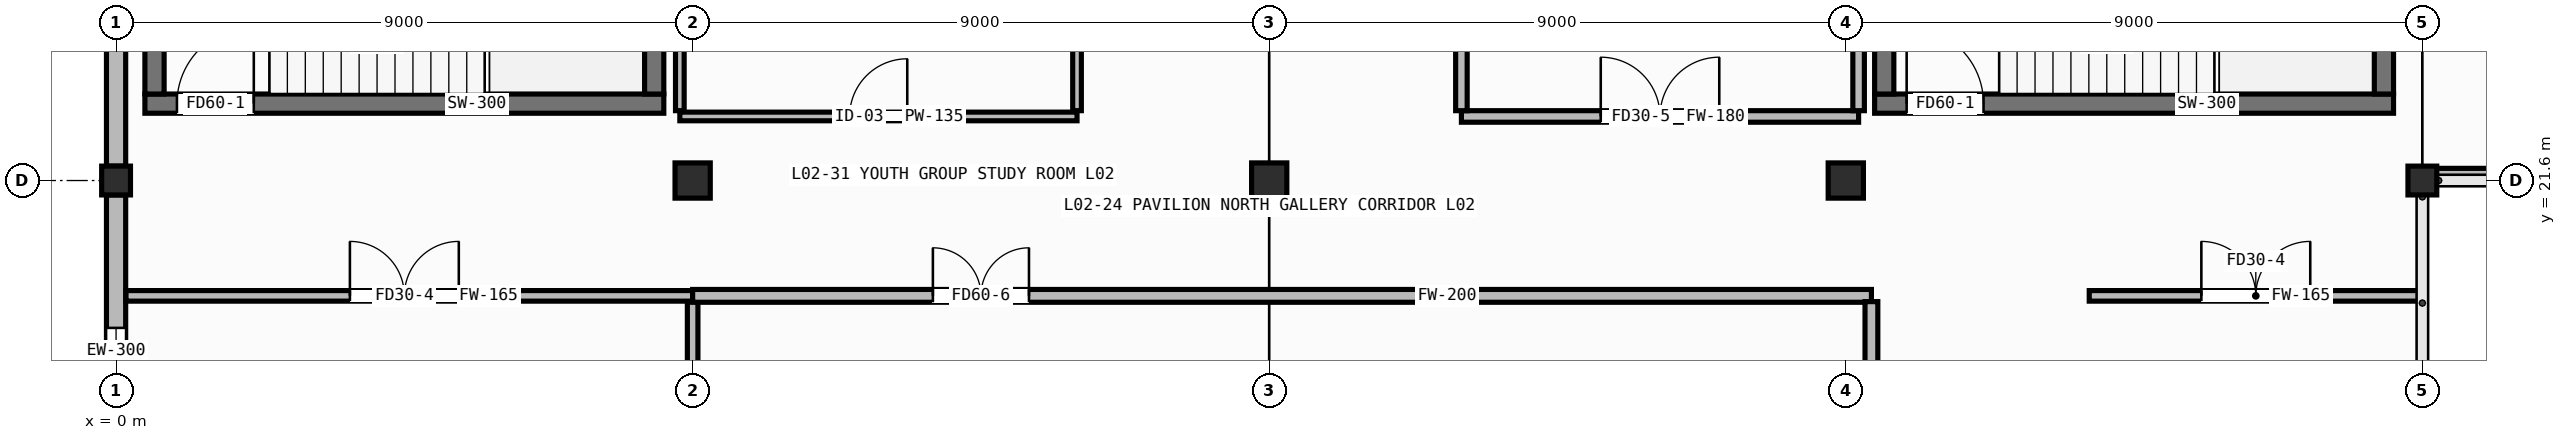
"""IFC4 building model, lengths in metres.
Left out: names, types, materials, properties, quantities, classifications, styles, units other than length and angle.
Written with IfcOpenShell. Run it as: python <this file> out.ifc"""

import sys

from ifc_helpers import new_model, si_unit, direction, frame, frame_2d, origin, origin_2d, place, context, subcontext, project, spatial, rectangle, hollow_rectangle, extrude, element, fill, save


model = new_model("IFC4")
c1 = context("Model", 3, precision=1e-05, world=origin(), true_north=direction((0.0, 1.0)))
c2 = subcontext(c1, "Body", "Model", "MODEL_VIEW")
j1 = project(units=[si_unit("LENGTHUNIT", "METRE"), si_unit("PLANEANGLEUNIT", "RADIAN")], contexts=[c1])
p1 = place(None, origin())
s1 = spatial("IfcSite", under=j1, at=p1, CompositionType="ELEMENT")
p2 = place(p1, origin())
s2 = spatial("IfcBuilding", under=s1, at=p2, CompositionType="ELEMENT")
p3 = place(p2, frame((0.0, 0.0, 4.8)))
s3 = spatial("IfcBuildingStorey", under=s2, at=p3, CompositionType="ELEMENT", Elevation=4.8)
p4 = place(p3, frame((0.0, 21.6, 0.0), z_axis=(0.0, 0.0, 1.0), x_axis=(1.0, 0.0, 0.0)))
e1 = element("IfcColumn", 1, at=p4, inside=s3, PredefinedType="COLUMN", context=c2, shape_type="SweptSolid", body=[
    extrude(hollow_rectangle(XDim=0.45, YDim=0.45, WallThickness=0.019, at=origin_2d()), origin(), (0.0, 0.0, 1.0), 4.0),
])
for number, where, z_axis, x_axis in (
    (2, (9.0, 21.6, 0.0), (0.0, 0.0, 1.0), (1.0, 0.0, 0.0)),
    (3, (18.0, 21.6, 0.0), (0.0, 0.0, 1.0), (1.0, 0.0, 0.0)),
    (4, (27.0, 21.6, 0.0), (0.0, 0.0, 1.0), (1.0, 0.0, 0.0)),
):
    element("IfcColumn", number, at=place(p3, frame(where, z_axis=z_axis, x_axis=x_axis)), inside=s3, PredefinedType="COLUMN", context=c2, shape_type="SweptSolid", body=[
        extrude(hollow_rectangle(XDim=0.55, YDim=0.55, WallThickness=0.022, at=origin_2d()), origin(), (0.0, 0.0, 1.0), 4.0),
    ])
p5 = place(p3, frame((36.0, 21.6, 0.0), z_axis=(0.0, 0.0, 1.0), x_axis=(1.0, 0.0, 0.0)))
e5 = element("IfcColumn", 5, at=p5, inside=s3, PredefinedType="COLUMN", context=c2, shape_type="SweptSolid", body=[
    extrude(hollow_rectangle(XDim=0.45, YDim=0.45, WallThickness=0.019, at=origin_2d()), origin(), (0.0, 0.0, 1.0), 4.0),
])
p6 = place(p3, frame((0.0, 14.625, 0.0), z_axis=(0.0, 0.0, 1.0), x_axis=(0.0, 1.0, 0.0)))
e6 = element("IfcWall", 6, at=p6, inside=s3, PredefinedType="STANDARD", context=c2, shape_type="SweptSolid", body=[
    extrude(rectangle(XDim=6.75, YDim=0.3, at=frame_2d((3.375, 0.0))), origin(), (0.0, 0.0, 1.0), 3.255),
])
p7 = place(p6, frame((2.075, 0.0, 0.85)))
e7 = element("IfcOpeningElement", 7, at=p7, cuts=e6, PredefinedType="OPENING", context=c2, shape_type="SweptSolid", body=[
    extrude(rectangle(XDim=2.6, YDim=1.6, at=frame_2d((1.3, 0.8))), frame((0.0, 0.162, 0.0), z_axis=(0.0, -1.0, 0.0), x_axis=(1.0, 0.0, 0.0)), (0.0, 0.0, 1.0), 0.324),
])
p8 = place(p3, frame((0.0, 21.825, 0.0), z_axis=(0.0, 0.0, 1.0), x_axis=(0.0, 1.0, 0.0)))
e8 = element("IfcWall", 8, at=p8, inside=s3, PredefinedType="STANDARD", context=c2, shape_type="SweptSolid", body=[
    extrude(rectangle(XDim=6.75, YDim=0.3, at=frame_2d((3.375, 0.0))), origin(), (0.0, 0.0, 1.0), 3.255),
])
p9 = place(p3, frame((36.0, 21.695, 4.0), z_axis=(0.0, 0.0, 1.0), x_axis=(1.0, 0.0, 0.0)))
e9 = element("IfcWall", 9, at=p9, inside=s3, PredefinedType="PARAPET", context=c2, shape_type="SweptSolid", body=[
    extrude(rectangle(XDim=9.0, YDim=0.19, at=frame_2d((4.5, 0.0))), origin(), (0.0, 0.0, 1.0), 0.65),
])
p10 = place(p3, frame((0.45, 22.8, 0.0), z_axis=(0.0, 0.0, 1.0), x_axis=(1.0, 0.0, 0.0)))
e10 = element("IfcWall", 10, at=p10, inside=s3, PredefinedType="SHEAR", context=c2, shape_type="SweptSolid", body=[
    extrude(rectangle(XDim=8.1, YDim=0.3, at=frame_2d((4.05, 0.0))), origin(), (0.0, 0.0, 1.0), 3.755),
])
p11 = place(p10, frame((0.5, 0.0, 0.0)))
e11 = element("IfcOpeningElement", 11, at=p11, cuts=e10, PredefinedType="OPENING", context=c2, shape_type="SweptSolid", body=[
    extrude(rectangle(XDim=1.2, YDim=2.1, at=frame_2d((0.6, 1.05))), frame((0.0, 0.162, 0.0), z_axis=(0.0, -1.0, 0.0), x_axis=(1.0, 0.0, 0.0)), (0.0, 0.0, 1.0), 0.324),
])
for number, where, z_axis, x_axis in (
    (12, (0.6, 22.95, 0.0), (0.0, 0.0, 1.0), (0.0, 1.0, 0.0)),
    (13, (8.4, 22.95, 0.0), (0.0, 0.0, 1.0), (0.0, 1.0, 0.0)),
):
    element("IfcWall", number, at=place(p3, frame(where, z_axis=z_axis, x_axis=x_axis)), inside=s3, PredefinedType="SHEAR", context=c2, shape_type="SweptSolid", body=[
        extrude(rectangle(XDim=3.8, YDim=0.3, at=frame_2d((1.9, 0.0))), origin(), (0.0, 0.0, 1.0), 3.755),
    ])
p12 = place(p3, frame((27.45, 22.8, 0.0), z_axis=(0.0, 0.0, 1.0), x_axis=(1.0, 0.0, 0.0)))
e14 = element("IfcWall", 14, at=p12, inside=s3, PredefinedType="SHEAR", context=c2, shape_type="SweptSolid", body=[
    extrude(rectangle(XDim=8.1, YDim=0.3, at=frame_2d((4.05, 0.0))), origin(), (0.0, 0.0, 1.0), 3.755),
])
p13 = place(p12, frame((0.5, 0.0, 0.0)))
e15 = element("IfcOpeningElement", 15, at=p13, cuts=e14, PredefinedType="OPENING", context=c2, shape_type="SweptSolid", body=[
    extrude(rectangle(XDim=1.2, YDim=2.1, at=frame_2d((0.6, 1.05))), frame((0.0, 0.162, 0.0), z_axis=(0.0, -1.0, 0.0), x_axis=(1.0, 0.0, 0.0)), (0.0, 0.0, 1.0), 0.324),
])
for number, where, z_axis, x_axis in (
    (16, (27.6, 22.95, 0.0), (0.0, 0.0, 1.0), (0.0, 1.0, 0.0)),
    (17, (35.4, 22.95, 0.0), (0.0, 0.0, 1.0), (0.0, 1.0, 0.0)),
):
    element("IfcWall", number, at=place(p3, frame(where, z_axis=z_axis, x_axis=x_axis)), inside=s3, PredefinedType="SHEAR", context=c2, shape_type="SweptSolid", body=[
        extrude(rectangle(XDim=3.8, YDim=0.3, at=frame_2d((1.9, 0.0))), origin(), (0.0, 0.0, 1.0), 3.755),
    ])
p14 = place(p3, frame((0.155, 19.8, 0.0), z_axis=(0.0, 0.0, 1.0), x_axis=(1.0, 0.0, 0.0)))
e18 = element("IfcWall", 18, at=p14, inside=s3, PredefinedType="PARTITIONING", context=c2, shape_type="SweptSolid", body=[
    extrude(rectangle(XDim=8.845, YDim=0.165, at=frame_2d((4.422, 0.0))), origin(), (0.0, 0.0, 1.0), 3.755),
])
p15 = place(p14, frame((3.495, 0.0, 0.0)))
e19 = element("IfcOpeningElement", 19, at=p15, cuts=e18, PredefinedType="OPENING", context=c2, shape_type="SweptSolid", body=[
    extrude(rectangle(XDim=1.7, YDim=2.12, at=frame_2d((0.85, 1.06))), frame((0.0, 0.094, 0.0), z_axis=(0.0, -1.0, 0.0), x_axis=(1.0, 0.0, 0.0)), (0.0, 0.0, 1.0), 0.189),
])
p16 = place(p3, frame((9.0, 0.585, 0.0), z_axis=(0.0, 0.0, 1.0), x_axis=(0.0, 1.0, 0.0)))
e20 = element("IfcWall", 20, at=p16, inside=s3, PredefinedType="PARTITIONING", context=c2, shape_type="SweptSolid", body=[
    extrude(rectangle(XDim=19.125, YDim=0.165, at=frame_2d((9.562, 0.0))), origin(), (0.0, 0.0, 1.0), 3.035),
])
p17 = place(p3, frame((9.0, 19.8, 0.0), z_axis=(0.0, 0.0, 1.0), x_axis=(1.0, 0.0, 0.0)))
e21 = element("IfcWall", 21, at=p17, inside=s3, PredefinedType="PARTITIONING", context=c2, shape_type="SweptSolid", body=[
    extrude(rectangle(XDim=18.4, YDim=0.2, at=frame_2d((9.2, 0.0))), origin(), (0.0, 0.0, 1.0), 3.755),
])
p18 = place(p17, frame((3.75, 0.0, 0.0)))
e22 = element("IfcOpeningElement", 22, at=p18, cuts=e21, PredefinedType="OPENING", context=c2, shape_type="SweptSolid", body=[
    extrude(rectangle(XDim=1.5, YDim=2.1, at=frame_2d((0.75, 1.05))), frame((0.0, 0.112, 0.0), z_axis=(0.0, -1.0, 0.0), x_axis=(1.0, 0.0, 0.0)), (0.0, 0.0, 1.0), 0.224),
])
p19 = place(p3, frame((27.4, 0.165, 0.0), z_axis=(0.0, 0.0, 1.0), x_axis=(0.0, 1.0, 0.0)))
e23 = element("IfcWall", 23, at=p19, inside=s3, PredefinedType="PARTITIONING", context=c2, shape_type="SweptSolid", body=[
    extrude(rectangle(XDim=19.545, YDim=0.2, at=frame_2d((9.772, 0.0))), origin(), (0.0, 0.0, 1.0), 3.755),
])
p20 = place(p3, frame((30.8, 19.8, 0.0), z_axis=(0.0, 0.0, 1.0), x_axis=(1.0, 0.0, 0.0)))
e24 = element("IfcWall", 24, at=p20, inside=s3, PredefinedType="PARTITIONING", context=c2, shape_type="SweptSolid", body=[
    extrude(rectangle(XDim=5.165, YDim=0.165, at=frame_2d((2.583, 0.0))), origin(), (0.0, 0.0, 1.0), 3.755),
])
p21 = place(p20, frame((1.75, 0.0, 0.0)))
e25 = element("IfcOpeningElement", 25, at=p21, cuts=e24, PredefinedType="OPENING", context=c2, shape_type="SweptSolid", body=[
    extrude(rectangle(XDim=1.7, YDim=2.12, at=frame_2d((0.85, 1.06))), frame((0.0, 0.094, 0.0), z_axis=(0.0, -1.0, 0.0), x_axis=(1.0, 0.0, 0.0)), (0.0, 0.0, 1.0), 0.189),
])
p22 = place(p3, frame((8.8, 22.6, 0.0), z_axis=(0.0, 0.0, 1.0), x_axis=(1.0, 0.0, 0.0)))
e26 = element("IfcWall", 26, at=p22, inside=s3, PredefinedType="PARTITIONING", context=c2, shape_type="SweptSolid", body=[
    extrude(rectangle(XDim=6.2, YDim=0.135, at=frame_2d((3.1, 0.0))), origin(), (0.0, 0.0, 1.0), 3.755),
])
p23 = place(p22, frame((2.65, 0.0, 0.0)))
e27 = element("IfcOpeningElement", 27, at=p23, cuts=e26, PredefinedType="OPENING", context=c2, shape_type="SweptSolid", body=[
    extrude(rectangle(XDim=0.9, YDim=2.02, at=frame_2d((0.45, 1.01))), frame((0.0, 0.08, 0.0), z_axis=(0.0, -1.0, 0.0), x_axis=(1.0, 0.0, 0.0)), (0.0, 0.0, 1.0), 0.159),
])
p24 = place(p3, frame((8.8, 22.69, 0.0), z_axis=(0.0, 0.0, 1.0), x_axis=(0.0, 1.0, 0.0)))
e28 = element("IfcWall", 28, at=p24, inside=s3, PredefinedType="PARTITIONING", context=c2, shape_type="SweptSolid", body=[
    extrude(rectangle(XDim=4.42, YDim=0.135, at=frame_2d((2.21, 0.0))), origin(), (0.0, 0.0, 1.0), 3.035),
])
p25 = place(p3, frame((15.0, 22.69, 0.0), z_axis=(0.0, 0.0, 1.0), x_axis=(0.0, 1.0, 0.0)))
e29 = element("IfcWall", 29, at=p25, inside=s3, PredefinedType="PARTITIONING", context=c2, shape_type="SweptSolid", body=[
    extrude(rectangle(XDim=4.42, YDim=0.135, at=frame_2d((2.21, 0.0))), origin(), (0.0, 0.0, 1.0), 3.755),
])
p26 = place(p3, frame((21.0, 22.6, 0.0), z_axis=(0.0, 0.0, 1.0), x_axis=(1.0, 0.0, 0.0)))
e30 = element("IfcWall", 30, at=p26, inside=s3, PredefinedType="PARTITIONING", context=c2, shape_type="SweptSolid", body=[
    extrude(rectangle(XDim=6.2, YDim=0.18, at=frame_2d((3.1, 0.0))), origin(), (0.0, 0.0, 1.0), 3.755),
])
p27 = place(p26, frame((2.175, 0.0, 0.0)))
e31 = element("IfcOpeningElement", 31, at=p27, cuts=e30, PredefinedType="OPENING", context=c2, shape_type="SweptSolid", body=[
    extrude(rectangle(XDim=1.85, YDim=2.12, at=frame_2d((0.925, 1.06))), frame((0.0, 0.102, 0.0), z_axis=(0.0, -1.0, 0.0), x_axis=(1.0, 0.0, 0.0)), (0.0, 0.0, 1.0), 0.204),
])
p28 = place(p3, frame((21.0, 22.69, 0.0), z_axis=(0.0, 0.0, 1.0), x_axis=(0.0, 1.0, 0.0)))
e32 = element("IfcWall", 32, at=p28, inside=s3, PredefinedType="PARTITIONING", context=c2, shape_type="SweptSolid", body=[
    extrude(rectangle(XDim=4.42, YDim=0.18, at=frame_2d((2.21, 0.0))), origin(), (0.0, 0.0, 1.0), 3.755),
])
p29 = place(p3, frame((27.2, 22.69, 0.0), z_axis=(0.0, 0.0, 1.0), x_axis=(0.0, 1.0, 0.0)))
e33 = element("IfcWall", 33, at=p29, inside=s3, PredefinedType="PARTITIONING", context=c2, shape_type="SweptSolid", body=[
    extrude(rectangle(XDim=4.42, YDim=0.18, at=frame_2d((2.21, 0.0))), origin(), (0.0, 0.0, 1.0), 3.035),
])
p30 = place(p7, origin())
e34 = element("IfcWindow", 34, at=p30, inside=s3, PartitioningType="DOUBLE_PANEL_VERTICAL", PredefinedType="WINDOW", context=c2, shape_type="SweptSolid", body=[
    extrude(rectangle(XDim=2.6, YDim=1.6, at=frame_2d((1.3, 0.8))), frame((0.0, 0.03, 0.0), z_axis=(0.0, -1.0, 0.0), x_axis=(1.0, 0.0, 0.0)), (0.0, 0.0, 1.0), 0.06),
])
fill(e7, e34)
p31 = place(p11, origin())
e35 = element("IfcDoor", 35, at=p31, inside=s3, OperationType="SINGLE_SWING_RIGHT", PredefinedType="DOOR", context=c2, shape_type="SweptSolid", body=[
    extrude(rectangle(XDim=1.2, YDim=2.1, at=frame_2d((0.6, 1.05))), frame((0.0, 0.025, 0.0), z_axis=(0.0, -1.0, 0.0), x_axis=(1.0, 0.0, 0.0)), (0.0, 0.0, 1.0), 0.05),
])
fill(e11, e35)
p32 = place(p13, origin())
e36 = element("IfcDoor", 36, at=p32, inside=s3, OperationType="SINGLE_SWING_LEFT", PredefinedType="DOOR", context=c2, shape_type="SweptSolid", body=[
    extrude(rectangle(XDim=1.2, YDim=2.1, at=frame_2d((0.6, 1.05))), frame((0.0, 0.025, 0.0), z_axis=(0.0, -1.0, 0.0), x_axis=(1.0, 0.0, 0.0)), (0.0, 0.0, 1.0), 0.05),
])
fill(e15, e36)
p33 = place(p15, origin())
e37 = element("IfcDoor", 37, at=p33, inside=s3, OperationType="DOUBLE_DOOR_SINGLE_SWING", PredefinedType="DOOR", context=c2, shape_type="SweptSolid", body=[
    extrude(rectangle(XDim=1.7, YDim=2.12, at=frame_2d((0.85, 1.06))), frame((0.0, 0.025, 0.0), z_axis=(0.0, -1.0, 0.0), x_axis=(1.0, 0.0, 0.0)), (0.0, 0.0, 1.0), 0.05),
])
fill(e19, e37)
p34 = place(p18, origin())
e38 = element("IfcDoor", 38, at=p34, inside=s3, OperationType="DOUBLE_DOOR_SINGLE_SWING", PredefinedType="DOOR", context=c2, shape_type="SweptSolid", body=[
    extrude(rectangle(XDim=1.5, YDim=2.1, at=frame_2d((0.75, 1.05))), frame((0.0, 0.025, 0.0), z_axis=(0.0, -1.0, 0.0), x_axis=(1.0, 0.0, 0.0)), (0.0, 0.0, 1.0), 0.05),
])
fill(e22, e38)
p35 = place(p21, origin())
e39 = element("IfcDoor", 39, at=p35, inside=s3, OperationType="DOUBLE_DOOR_SINGLE_SWING", PredefinedType="DOOR", context=c2, shape_type="SweptSolid", body=[
    extrude(rectangle(XDim=1.7, YDim=2.12, at=frame_2d((0.85, 1.06))), frame((0.0, 0.025, 0.0), z_axis=(0.0, -1.0, 0.0), x_axis=(1.0, 0.0, 0.0)), (0.0, 0.0, 1.0), 0.05),
])
fill(e25, e39)
p36 = place(p23, origin())
e40 = element("IfcDoor", 40, at=p36, inside=s3, OperationType="SINGLE_SWING_RIGHT", PredefinedType="DOOR", context=c2, shape_type="SweptSolid", body=[
    extrude(rectangle(XDim=0.9, YDim=2.02, at=frame_2d((0.45, 1.01))), frame((0.0, 0.025, 0.0), z_axis=(0.0, -1.0, 0.0), x_axis=(1.0, 0.0, 0.0)), (0.0, 0.0, 1.0), 0.05),
])
fill(e27, e40)
p37 = place(p27, origin())
e41 = element("IfcDoor", 41, at=p37, inside=s3, OperationType="DOUBLE_DOOR_SINGLE_SWING", PredefinedType="DOOR", context=c2, shape_type="SweptSolid", body=[
    extrude(rectangle(XDim=1.85, YDim=2.12, at=frame_2d((0.925, 1.06))), frame((0.0, 0.025, 0.0), z_axis=(0.0, -1.0, 0.0), x_axis=(1.0, 0.0, 0.0)), (0.0, 0.0, 1.0), 0.05),
])
fill(e31, e41)
save(model, sys.argv[1])
